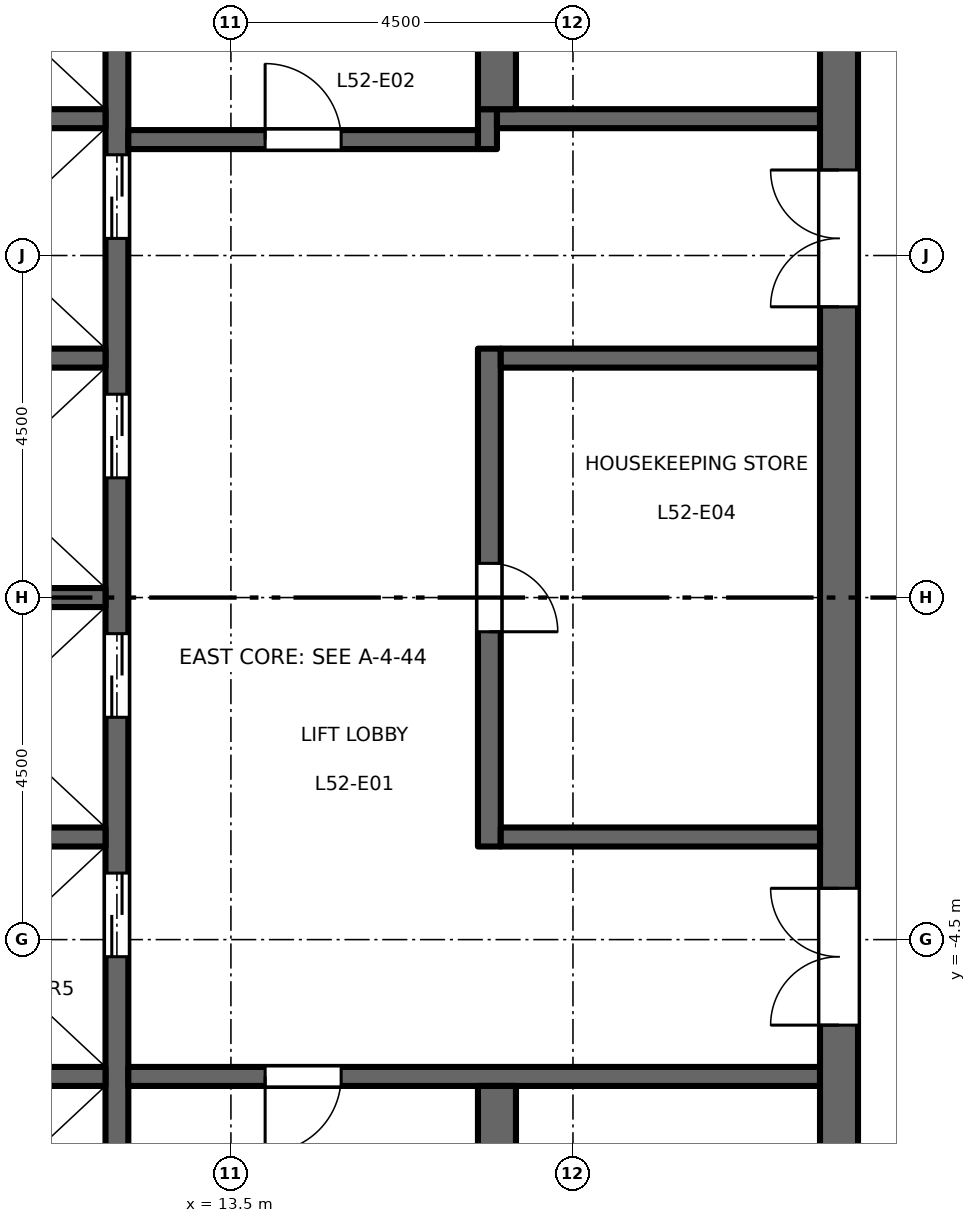
"""IFC4 building model, lengths in metres.
Left out: names, types, materials, properties, quantities, classifications, styles, units other than length and angle.
Written with IfcOpenShell. Run it as: python <this file> out.ifc"""

import sys

from ifc_helpers import new_model, si_unit, direction, frame, frame_2d, origin, place, context, subcontext, project, spatial, rectangle, extrude, element, fill, save


model = new_model("IFC4")
c1 = context("Model", 3, precision=1e-05, world=origin(), true_north=direction((0.0, 1.0)))
c2 = subcontext(c1, "Body", "Model", "MODEL_VIEW")
j1 = project(units=[si_unit("LENGTHUNIT", "METRE"), si_unit("PLANEANGLEUNIT", "RADIAN")], contexts=[c1])
p1 = place(None, origin())
s1 = spatial("IfcSite", under=j1, at=p1, CompositionType="ELEMENT")
p2 = place(p1, origin())
s2 = spatial("IfcBuilding", under=s1, at=p2, CompositionType="ELEMENT")
p3 = place(p2, frame((0.0, 0.0, 242.2)))
s3 = spatial("IfcBuildingStorey", under=s2, at=p3, CompositionType="ELEMENT", Elevation=242.2)
p4 = place(p3, frame((12.0, -9.45, 0.0), z_axis=(0.0, 0.0, 1.0), x_axis=(0.0, 1.0, 0.0)))
e1 = element("IfcWall", 1, at=p4, inside=s3, PredefinedType="SHEAR", context=c2, shape_type="SweptSolid", body=[
    extrude(rectangle(XDim=18.9, YDim=0.3, at=frame_2d((9.45, 0.0))), origin(), (0.0, 0.0, 1.0), 4.35),
])
p5 = place(p4, frame((4.725, 0.0, 0.0)))
e2 = element("IfcOpeningElement", 2, at=p5, cuts=e1, PredefinedType="OPENING", context=c2, shape_type="SweptSolid", body=[
    extrude(rectangle(XDim=1.1, YDim=2.1, at=frame_2d((0.55, 1.05))), frame((0.0, 0.16, 0.0), z_axis=(0.0, -1.0, 0.0), x_axis=(1.0, 0.0, 0.0)), (0.0, 0.0, 1.0), 0.32),
])
p6 = place(p4, frame((7.875, 0.0, 0.0)))
e3 = element("IfcOpeningElement", 3, at=p6, cuts=e1, PredefinedType="OPENING", context=c2, shape_type="SweptSolid", body=[
    extrude(rectangle(XDim=1.1, YDim=2.1, at=frame_2d((0.55, 1.05))), frame((0.0, 0.16, 0.0), z_axis=(0.0, -1.0, 0.0), x_axis=(1.0, 0.0, 0.0)), (0.0, 0.0, 1.0), 0.32),
])
p7 = place(p4, frame((11.025, 0.0, 0.0)))
e4 = element("IfcOpeningElement", 4, at=p7, cuts=e1, PredefinedType="OPENING", context=c2, shape_type="SweptSolid", body=[
    extrude(rectangle(XDim=1.1, YDim=2.1, at=frame_2d((0.55, 1.05))), frame((0.0, 0.16, 0.0), z_axis=(0.0, -1.0, 0.0), x_axis=(1.0, 0.0, 0.0)), (0.0, 0.0, 1.0), 0.32),
])
p8 = place(p4, frame((14.175, 0.0, 0.0)))
e5 = element("IfcOpeningElement", 5, at=p8, cuts=e1, PredefinedType="OPENING", context=c2, shape_type="SweptSolid", body=[
    extrude(rectangle(XDim=1.1, YDim=2.1, at=frame_2d((0.55, 1.05))), frame((0.0, 0.16, 0.0), z_axis=(0.0, -1.0, 0.0), x_axis=(1.0, 0.0, 0.0)), (0.0, 0.0, 1.0), 0.32),
])
p9 = place(p4, frame((16.725, 0.0, 0.0)))
e6 = element("IfcOpeningElement", 6, at=p9, cuts=e1, PredefinedType="OPENING", context=c2, shape_type="SweptSolid", body=[
    extrude(rectangle(XDim=1.2, YDim=2.1, at=frame_2d((0.6, 1.05))), frame((0.0, 0.16, 0.0), z_axis=(0.0, -1.0, 0.0), x_axis=(1.0, 0.0, 0.0)), (0.0, 0.0, 1.0), 0.32),
])
p10 = place(p4, frame((0.975, 0.0, 0.0)))
e7 = element("IfcOpeningElement", 7, at=p10, cuts=e1, PredefinedType="OPENING", context=c2, shape_type="SweptSolid", body=[
    extrude(rectangle(XDim=1.2, YDim=2.1, at=frame_2d((0.6, 1.05))), frame((0.0, 0.16, 0.0), z_axis=(0.0, -1.0, 0.0), x_axis=(1.0, 0.0, 0.0)), (0.0, 0.0, 1.0), 0.32),
])
p11 = place(p3, frame((12.15, 6.025, 0.0), z_axis=(0.0, 0.0, 1.0), x_axis=(1.0, 0.0, 0.0)))
e8 = element("IfcWall", 8, at=p11, inside=s3, PredefinedType="SHEAR", context=c2, shape_type="SweptSolid", body=[
    extrude(rectangle(XDim=4.6, YDim=0.25, at=frame_2d((2.3, 0.0))), origin(), (0.0, 0.0, 1.0), 4.35),
])
p12 = place(p11, frame((1.8, 0.0, 0.0)))
e9 = element("IfcOpeningElement", 9, at=p12, cuts=e8, PredefinedType="OPENING", context=c2, shape_type="SweptSolid", body=[
    extrude(rectangle(XDim=1.0, YDim=2.1, at=frame_2d((0.5, 1.05))), frame((0.0, 0.135, 0.0), z_axis=(0.0, -1.0, 0.0), x_axis=(1.0, 0.0, 0.0)), (0.0, 0.0, 1.0), 0.27),
])
p13 = place(p3, frame((16.875, 5.9, 0.0), z_axis=(0.0, 0.0, 1.0), x_axis=(0.0, 1.0, 0.0)))
e10 = element("IfcWall", 10, at=p13, inside=s3, PredefinedType="SHEAR", context=c2, shape_type="SweptSolid", body=[
    extrude(rectangle(XDim=0.525, YDim=0.25, at=frame_2d((0.263, 0.0))), origin(), (0.0, 0.0, 1.0), 4.35),
])
p14 = place(p3, frame((17.0, 6.3, 0.0), z_axis=(0.0, 0.0, 1.0), x_axis=(1.0, 0.0, 0.0)))
e11 = element("IfcWall", 11, at=p14, inside=s3, PredefinedType="SHEAR", context=c2, shape_type="SweptSolid", body=[
    extrude(rectangle(XDim=4.25, YDim=0.25, at=frame_2d((2.125, 0.0))), origin(), (0.0, 0.0, 1.0), 4.35),
])
p15 = place(p3, frame((12.15, -6.3, 0.0), z_axis=(0.0, 0.0, 1.0), x_axis=(1.0, 0.0, 0.0)))
e12 = element("IfcWall", 12, at=p15, inside=s3, PredefinedType="SHEAR", context=c2, shape_type="SweptSolid", body=[
    extrude(rectangle(XDim=9.1, YDim=0.25, at=frame_2d((4.55, 0.0))), origin(), (0.0, 0.0, 1.0), 4.35),
])
p16 = place(p15, frame((1.8, 0.0, 0.0)))
e13 = element("IfcOpeningElement", 13, at=p16, cuts=e12, PredefinedType="OPENING", context=c2, shape_type="SweptSolid", body=[
    extrude(rectangle(XDim=1.0, YDim=2.1, at=frame_2d((0.5, 1.05))), frame((0.0, 0.135, 0.0), z_axis=(0.0, -1.0, 0.0), x_axis=(1.0, 0.0, 0.0)), (0.0, 0.0, 1.0), 0.27),
])
p17 = place(p3, frame((21.5, -13.0, 0.0), z_axis=(0.0, 0.0, 1.0), x_axis=(0.0, 1.0, 0.0)))
e14 = element("IfcWall", 14, at=p17, inside=s3, PredefinedType="SHEAR", context=c2, shape_type="SweptSolid", body=[
    extrude(rectangle(XDim=26.0, YDim=0.5, at=frame_2d((13.0, 0.0))), origin(), (0.0, 0.0, 1.0), 4.35),
])
p18 = place(p17, frame((16.825, 0.0, 0.0)))
e15 = element("IfcOpeningElement", 15, at=p18, cuts=e14, PredefinedType="OPENING", context=c2, shape_type="SweptSolid", body=[
    extrude(rectangle(XDim=1.8, YDim=2.1, at=frame_2d((0.9, 1.05))), frame((0.0, 0.26, 0.0), z_axis=(0.0, -1.0, 0.0), x_axis=(1.0, 0.0, 0.0)), (0.0, 0.0, 1.0), 0.52),
])
p19 = place(p17, frame((7.375, 0.0, 0.0)))
e16 = element("IfcOpeningElement", 16, at=p19, cuts=e14, PredefinedType="OPENING", context=c2, shape_type="SweptSolid", body=[
    extrude(rectangle(XDim=1.8, YDim=2.1, at=frame_2d((0.9, 1.05))), frame((0.0, 0.26, 0.0), z_axis=(0.0, -1.0, 0.0), x_axis=(1.0, 0.0, 0.0)), (0.0, 0.0, 1.0), 0.52),
])
p20 = place(p3, frame((16.9, -3.275, 0.0), z_axis=(0.0, 0.0, 1.0), x_axis=(0.0, 1.0, 0.0)))
e17 = element("IfcWall", 17, at=p20, inside=s3, PredefinedType="SHEAR", context=c2, shape_type="SweptSolid", body=[
    extrude(rectangle(XDim=6.55, YDim=0.3, at=frame_2d((3.275, 0.0))), origin(), (0.0, 0.0, 1.0), 4.35),
])
p21 = place(p20, frame((2.825, 0.0, 0.0)))
e18 = element("IfcOpeningElement", 18, at=p21, cuts=e17, PredefinedType="OPENING", context=c2, shape_type="SweptSolid", body=[
    extrude(rectangle(XDim=0.9, YDim=2.1, at=frame_2d((0.45, 1.05))), frame((0.0, 0.16, 0.0), z_axis=(0.0, -1.0, 0.0), x_axis=(1.0, 0.0, 0.0)), (0.0, 0.0, 1.0), 0.32),
])
for number, where, z_axis, x_axis in (
    (19, (17.05, 3.15, 0.0), (0.0, 0.0, 1.0), (1.0, 0.0, 0.0)),
    (20, (17.05, -3.15, 0.0), (0.0, 0.0, 1.0), (1.0, 0.0, 0.0)),
):
    element("IfcWall", number, at=place(p3, frame(where, z_axis=z_axis, x_axis=x_axis)), inside=s3, PredefinedType="SHEAR", context=c2, shape_type="SweptSolid", body=[
        extrude(rectangle(XDim=4.2, YDim=0.25, at=frame_2d((2.1, 0.0))), origin(), (0.0, 0.0, 1.0), 4.35),
    ])
for number, where, z_axis, x_axis in (
    (21, (17.0, 6.425, 0.0), (0.0, 0.0, 1.0), (0.0, 1.0, 0.0)),
    (22, (17.0, -13.0, 0.0), (0.0, 0.0, 1.0), (0.0, 1.0, 0.0)),
):
    element("IfcWall", number, at=place(p3, frame(where, z_axis=z_axis, x_axis=x_axis)), inside=s3, PredefinedType="SHEAR", context=c2, shape_type="SweptSolid", body=[
        extrude(rectangle(XDim=6.575, YDim=0.5, at=frame_2d((3.288, 0.0))), origin(), (0.0, 0.0, 1.0), 4.35),
    ])
for number, where, z_axis, x_axis in (
    (23, (8.75, 0.0, 0.0), (0.0, 0.0, 1.0), (1.0, 0.0, 0.0)),
    (24, (8.75, 3.15, 0.0), (0.0, 0.0, 1.0), (1.0, 0.0, 0.0)),
    (25, (8.75, 6.3, 0.0), (0.0, 0.0, 1.0), (1.0, 0.0, 0.0)),
    (26, (8.75, -3.15, 0.0), (0.0, 0.0, 1.0), (1.0, 0.0, 0.0)),
    (27, (8.75, -6.3, 0.0), (0.0, 0.0, 1.0), (1.0, 0.0, 0.0)),
):
    element("IfcWall", number, at=place(p3, frame(where, z_axis=z_axis, x_axis=x_axis)), inside=s3, PredefinedType="SHEAR", context=c2, shape_type="SweptSolid", body=[
        extrude(rectangle(XDim=3.1, YDim=0.25, at=frame_2d((1.55, 0.0))), origin(), (0.0, 0.0, 1.0), 4.35),
    ])
p22 = place(p12, origin())
e28 = element("IfcDoor", 28, at=p22, inside=s3, OperationType="SINGLE_SWING_RIGHT", PredefinedType="DOOR", context=c2, shape_type="SweptSolid", body=[
    extrude(rectangle(XDim=1.0, YDim=2.1, at=frame_2d((0.5, 1.05))), frame((0.0, 0.025, 0.0), z_axis=(0.0, -1.0, 0.0), x_axis=(1.0, 0.0, 0.0)), (0.0, 0.0, 1.0), 0.05),
])
fill(e9, e28)
p23 = place(p16, origin())
e29 = element("IfcDoor", 29, at=p23, inside=s3, OperationType="SINGLE_SWING_LEFT", PredefinedType="DOOR", context=c2, shape_type="SweptSolid", body=[
    extrude(rectangle(XDim=1.0, YDim=2.1, at=frame_2d((0.5, 1.05))), frame((0.0, 0.025, 0.0), z_axis=(0.0, -1.0, 0.0), x_axis=(1.0, 0.0, 0.0)), (0.0, 0.0, 1.0), 0.05),
])
fill(e13, e29)
p24 = place(p18, origin())
e30 = element("IfcDoor", 30, at=p24, inside=s3, OperationType="DOUBLE_DOOR_DOUBLE_SWING", PredefinedType="DOOR", context=c2, shape_type="SweptSolid", body=[
    extrude(rectangle(XDim=1.8, YDim=2.1, at=frame_2d((0.9, 1.05))), frame((0.0, 0.025, 0.0), z_axis=(0.0, -1.0, 0.0), x_axis=(1.0, 0.0, 0.0)), (0.0, 0.0, 1.0), 0.05),
])
fill(e15, e30)
p25 = place(p19, origin())
e31 = element("IfcDoor", 31, at=p25, inside=s3, OperationType="DOUBLE_DOOR_DOUBLE_SWING", PredefinedType="DOOR", context=c2, shape_type="SweptSolid", body=[
    extrude(rectangle(XDim=1.8, YDim=2.1, at=frame_2d((0.9, 1.05))), frame((0.0, 0.025, 0.0), z_axis=(0.0, -1.0, 0.0), x_axis=(1.0, 0.0, 0.0)), (0.0, 0.0, 1.0), 0.05),
])
fill(e16, e31)
p26 = place(p5, origin())
e32 = element("IfcDoor", 32, at=p26, inside=s3, OperationType="DOUBLE_DOOR_SLIDING", PredefinedType="DOOR", context=c2, shape_type="SweptSolid", body=[
    extrude(rectangle(XDim=1.1, YDim=2.1, at=frame_2d((0.55, 1.05))), frame((0.0, 0.025, 0.0), z_axis=(0.0, -1.0, 0.0), x_axis=(1.0, 0.0, 0.0)), (0.0, 0.0, 1.0), 0.05),
])
fill(e2, e32)
p27 = place(p6, origin())
e33 = element("IfcDoor", 33, at=p27, inside=s3, OperationType="DOUBLE_DOOR_SLIDING", PredefinedType="DOOR", context=c2, shape_type="SweptSolid", body=[
    extrude(rectangle(XDim=1.1, YDim=2.1, at=frame_2d((0.55, 1.05))), frame((0.0, 0.025, 0.0), z_axis=(0.0, -1.0, 0.0), x_axis=(1.0, 0.0, 0.0)), (0.0, 0.0, 1.0), 0.05),
])
fill(e3, e33)
p28 = place(p7, origin())
e34 = element("IfcDoor", 34, at=p28, inside=s3, OperationType="DOUBLE_DOOR_SLIDING", PredefinedType="DOOR", context=c2, shape_type="SweptSolid", body=[
    extrude(rectangle(XDim=1.1, YDim=2.1, at=frame_2d((0.55, 1.05))), frame((0.0, 0.025, 0.0), z_axis=(0.0, -1.0, 0.0), x_axis=(1.0, 0.0, 0.0)), (0.0, 0.0, 1.0), 0.05),
])
fill(e4, e34)
p29 = place(p8, origin())
e35 = element("IfcDoor", 35, at=p29, inside=s3, OperationType="DOUBLE_DOOR_SLIDING", PredefinedType="DOOR", context=c2, shape_type="SweptSolid", body=[
    extrude(rectangle(XDim=1.1, YDim=2.1, at=frame_2d((0.55, 1.05))), frame((0.0, 0.025, 0.0), z_axis=(0.0, -1.0, 0.0), x_axis=(1.0, 0.0, 0.0)), (0.0, 0.0, 1.0), 0.05),
])
fill(e5, e35)
p30 = place(p21, origin())
e36 = element("IfcDoor", 36, at=p30, inside=s3, OperationType="SINGLE_SWING_LEFT", PredefinedType="DOOR", context=c2, shape_type="SweptSolid", body=[
    extrude(rectangle(XDim=0.9, YDim=2.1, at=frame_2d((0.45, 1.05))), frame((0.0, 0.025, 0.0), z_axis=(0.0, -1.0, 0.0), x_axis=(1.0, 0.0, 0.0)), (0.0, 0.0, 1.0), 0.05),
])
fill(e18, e36)
save(model, sys.argv[1])
